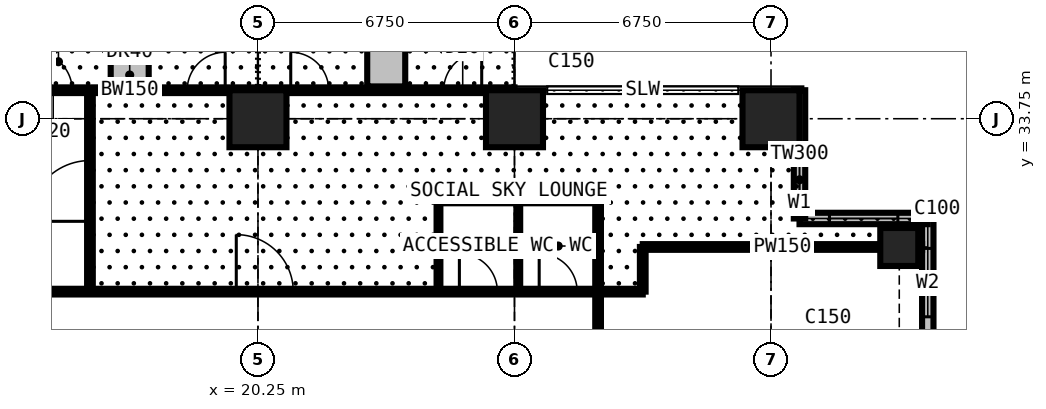
"""IFC4 building model, lengths in metres.
Left out: names, types, materials, properties, quantities, classifications, styles, units other than length and angle.
Written with IfcOpenShell. Run it as: python <this file> out.ifc"""

import sys

from ifc_helpers import new_model, si_unit, direction, frame, frame_2d, origin, origin_2d, place, context, subcontext, project, spatial, rectangle, extrude, element, fill, save


model = new_model("IFC4")
c1 = context("Model", 3, precision=1e-05, world=origin(), true_north=direction((0.0, 1.0)))
c2 = subcontext(c1, "Body", "Model", "MODEL_VIEW")
j1 = project(units=[si_unit("LENGTHUNIT", "METRE"), si_unit("PLANEANGLEUNIT", "RADIAN")], contexts=[c1])
p1 = place(None, origin())
s1 = spatial("IfcSite", under=j1, at=p1, CompositionType="ELEMENT")
p2 = place(p1, origin())
s2 = spatial("IfcBuilding", under=s1, at=p2, CompositionType="ELEMENT")
p3 = place(p2, frame((0.0, 0.0, 108.9)))
s3 = spatial("IfcBuildingStorey", under=s2, at=p3, CompositionType="ELEMENT", Elevation=108.9)
for number, where, z_axis, x_axis in (
    (1, (20.25, 33.75, 0.0), (0.0, 0.0, 1.0), (1.0, 0.0, 0.0)),
    (2, (27.0, 33.75, 0.0), (0.0, 0.0, 1.0), (1.0, 0.0, 0.0)),
    (3, (33.75, 33.75, 0.0), (0.0, 0.0, 1.0), (1.0, 0.0, 0.0)),
):
    element("IfcColumn", number, at=place(p3, frame(where, z_axis=z_axis, x_axis=x_axis)), inside=s3, PredefinedType="COLUMN", context=c2, shape_type="SweptSolid", body=[
        extrude(rectangle(XDim=1.5, YDim=1.5, at=origin_2d()), origin(), (0.0, 0.0, 1.0), 3.6),
    ])
p4 = place(p3, frame((37.125, 30.375, 0.0), z_axis=(0.0, 0.0, 1.0), x_axis=(1.0, 0.0, 0.0)))
e4 = element("IfcColumn", 4, at=p4, inside=s3, PredefinedType="COLUMN", context=c2, shape_type="SweptSolid", body=[
    extrude(rectangle(XDim=1.0, YDim=1.0, at=origin_2d()), origin(), (0.0, 0.0, 1.0), 3.6),
])
p5 = place(p3, frame((37.875, 27.75, 0.0), z_axis=(0.0, 0.0, 1.0), x_axis=(0.0, 1.0, 0.0)))
e5 = element("IfcWall", 5, at=p5, inside=s3, PredefinedType="SOLIDWALL", context=c2, shape_type="SweptSolid", body=[
    extrude(rectangle(XDim=3.375, YDim=0.3, at=frame_2d((1.688, 0.0))), origin(), (0.0, 0.0, 1.0), 3.375),
])
p6 = place(p5, frame((0.788, 0.0, 0.6)))
e6 = element("IfcOpeningElement", 6, at=p6, cuts=e5, PredefinedType="OPENING", context=c2, shape_type="SweptSolid", body=[
    extrude(rectangle(XDim=1.8, YDim=2.1, at=frame_2d((0.9, 1.05))), frame((0.0, 0.16, 0.0), z_axis=(0.0, -1.0, 0.0), x_axis=(1.0, 0.0, 0.0)), (0.0, 0.0, 1.0), 0.32),
])
p7 = place(p3, frame((37.875, 31.125, 0.0), z_axis=(0.0, 0.0, 1.0), x_axis=(-1.0, 0.0, 0.0)))
e7 = element("IfcWall", 7, at=p7, inside=s3, PredefinedType="SOLIDWALL", context=c2, shape_type="SweptSolid", body=[
    extrude(rectangle(XDim=3.375, YDim=0.3, at=frame_2d((1.688, 0.0))), origin(), (0.0, 0.0, 1.0), 3.375),
])
p8 = place(p7, frame((0.788, 0.0, 0.6)))
e8 = element("IfcOpeningElement", 8, at=p8, cuts=e7, PredefinedType="OPENING", context=c2, shape_type="SweptSolid", body=[
    extrude(rectangle(XDim=1.8, YDim=2.1, at=frame_2d((0.9, 1.05))), frame((0.0, 0.16, 0.0), z_axis=(0.0, -1.0, 0.0), x_axis=(1.0, 0.0, 0.0)), (0.0, 0.0, 1.0), 0.32),
])
p9 = place(p3, frame((34.5, 31.125, 0.0), z_axis=(0.0, 0.0, 1.0), x_axis=(0.0, 1.0, 0.0)))
e9 = element("IfcWall", 9, at=p9, inside=s3, PredefinedType="SOLIDWALL", context=c2, shape_type="SweptSolid", body=[
    extrude(rectangle(XDim=3.375, YDim=0.3, at=frame_2d((1.688, 0.0))), origin(), (0.0, 0.0, 1.0), 3.375),
])
p10 = place(p9, frame((0.268, 0.0, 0.9)))
e10 = element("IfcOpeningElement", 10, at=p10, cuts=e9, PredefinedType="OPENING", context=c2, shape_type="SweptSolid", body=[
    extrude(rectangle(XDim=1.5, YDim=1.8, at=frame_2d((0.75, 0.9))), frame((0.0, 0.16, 0.0), z_axis=(0.0, -1.0, 0.0), x_axis=(1.0, 0.0, 0.0)), (0.0, 0.0, 1.0), 0.32),
])
p11 = place(p3, frame((13.5, 34.5, 0.0), z_axis=(0.0, 0.0, 1.0), x_axis=(1.0, 0.0, 0.0)))
e11 = element("IfcWall", 11, at=p11, inside=s3, PredefinedType="SOLIDWALL", context=c2, shape_type="SweptSolid", body=[
    extrude(rectangle(XDim=6.75, YDim=0.15, at=frame_2d((3.375, 0.0))), origin(), (0.0, 0.0, 1.0), 3.375),
])
p12 = place(p11, frame((0.863, 0.0, 0.0)))
e12 = element("IfcOpeningElement", 12, at=p12, cuts=e11, PredefinedType="OPENING", context=c2, shape_type="SweptSolid", body=[
    extrude(rectangle(XDim=1.0, YDim=2.2, at=frame_2d((0.5, 1.1))), frame((0.0, 0.085, 0.0), z_axis=(0.0, -1.0, 0.0), x_axis=(1.0, 0.0, 0.0)), (0.0, 0.0, 1.0), 0.17),
])
p13 = place(p11, frame((2.512, 0.0, 0.9)))
e13 = element("IfcOpeningElement", 13, at=p13, cuts=e11, PredefinedType="OPENING", context=c2, shape_type="SweptSolid", body=[
    extrude(rectangle(XDim=0.9, YDim=1.8, at=frame_2d((0.45, 0.9))), frame((0.0, 0.085, 0.0), z_axis=(0.0, -1.0, 0.0), x_axis=(1.0, 0.0, 0.0)), (0.0, 0.0, 1.0), 0.17),
])
p14 = place(p11, frame((4.887, 0.0, 0.0)))
e14 = element("IfcOpeningElement", 14, at=p14, cuts=e11, PredefinedType="OPENING", context=c2, shape_type="SweptSolid", body=[
    extrude(rectangle(XDim=1.0, YDim=2.2, at=frame_2d((0.5, 1.1))), frame((0.0, 0.085, 0.0), z_axis=(0.0, -1.0, 0.0), x_axis=(1.0, 0.0, 0.0)), (0.0, 0.0, 1.0), 0.17),
])
p15 = place(p11, frame((3.575, 0.0, 0.9)))
e15 = element("IfcOpeningElement", 15, at=p15, cuts=e11, PredefinedType="OPENING", context=c2, shape_type="SweptSolid", body=[
    extrude(rectangle(XDim=1.2, YDim=1.8, at=frame_2d((0.6, 0.9))), frame((0.0, 0.085, 0.0), z_axis=(0.0, -1.0, 0.0), x_axis=(1.0, 0.0, 0.0)), (0.0, 0.0, 1.0), 0.17),
])
p16 = place(p3, frame((20.25, 34.5, 0.0), z_axis=(0.0, 0.0, 1.0), x_axis=(1.0, 0.0, 0.0)))
e16 = element("IfcWall", 16, at=p16, inside=s3, PredefinedType="SOLIDWALL", context=c2, shape_type="SweptSolid", body=[
    extrude(rectangle(XDim=6.75, YDim=0.15, at=frame_2d((3.375, 0.0))), origin(), (0.0, 0.0, 1.0), 3.375),
])
p17 = place(p16, frame((0.863, 0.0, 0.0)))
e17 = element("IfcOpeningElement", 17, at=p17, cuts=e16, PredefinedType="OPENING", context=c2, shape_type="SweptSolid", body=[
    extrude(rectangle(XDim=1.0, YDim=2.2, at=frame_2d((0.5, 1.1))), frame((0.0, 0.085, 0.0), z_axis=(0.0, -1.0, 0.0), x_axis=(1.0, 0.0, 0.0)), (0.0, 0.0, 1.0), 0.17),
])
p18 = place(p16, frame((1.975, 0.0, 0.9)))
e18 = element("IfcOpeningElement", 18, at=p18, cuts=e16, PredefinedType="OPENING", context=c2, shape_type="SweptSolid", body=[
    extrude(rectangle(XDim=1.2, YDim=1.8, at=frame_2d((0.6, 0.9))), frame((0.0, 0.085, 0.0), z_axis=(0.0, -1.0, 0.0), x_axis=(1.0, 0.0, 0.0)), (0.0, 0.0, 1.0), 0.17),
])
p19 = place(p16, frame((4.887, 0.0, 0.0)))
e19 = element("IfcOpeningElement", 19, at=p19, cuts=e16, PredefinedType="OPENING", context=c2, shape_type="SweptSolid", body=[
    extrude(rectangle(XDim=1.0, YDim=2.2, at=frame_2d((0.5, 1.1))), frame((0.0, 0.085, 0.0), z_axis=(0.0, -1.0, 0.0), x_axis=(1.0, 0.0, 0.0)), (0.0, 0.0, 1.0), 0.17),
])
p20 = place(p16, frame((3.575, 0.0, 0.9)))
e20 = element("IfcOpeningElement", 20, at=p20, cuts=e16, PredefinedType="OPENING", context=c2, shape_type="SweptSolid", body=[
    extrude(rectangle(XDim=1.2, YDim=1.8, at=frame_2d((0.6, 0.9))), frame((0.0, 0.085, 0.0), z_axis=(0.0, -1.0, 0.0), x_axis=(1.0, 0.0, 0.0)), (0.0, 0.0, 1.0), 0.17),
])
for number, where, z_axis, x_axis in (
    (21, (16.875, 34.6, 0.0), (0.0, 0.0, 1.0), (0.0, 1.0, 0.0)),
    (22, (23.625, 34.6, 0.0), (0.0, 0.0, 1.0), (0.0, 1.0, 0.0)),
):
    element("IfcWall", number, at=place(p3, frame(where, z_axis=z_axis, x_axis=x_axis)), inside=s3, PredefinedType="USERDEFINED", context=c2, shape_type="SweptSolid", body=[
        extrude(rectangle(XDim=2.2, YDim=1.0, at=frame_2d((1.1, 0.0))), origin(), (0.0, 0.0, 1.0), 0.9),
    ])
p21 = place(p3, frame((11.3, 29.2, 0.0), z_axis=(0.0, 0.0, 1.0), x_axis=(1.0, 0.0, 0.0)))
e23 = element("IfcWall", 23, at=p21, inside=s3, PredefinedType="PARTITIONING", context=c2, shape_type="SweptSolid", body=[
    extrude(rectangle(XDim=19.075, YDim=0.15, at=frame_2d((9.538, 0.0))), origin(), (0.0, 0.0, 1.0), 3.375),
])
p22 = place(p21, frame((14.25, 0.0, 0.0)))
e24 = element("IfcOpeningElement", 24, at=p22, cuts=e23, PredefinedType="OPENING", context=c2, shape_type="SweptSolid", body=[
    extrude(rectangle(XDim=1.0, YDim=2.2, at=frame_2d((0.5, 1.1))), frame((0.0, 0.085, 0.0), z_axis=(0.0, -1.0, 0.0), x_axis=(1.0, 0.0, 0.0)), (0.0, 0.0, 1.0), 0.17),
])
p23 = place(p21, frame((16.35, 0.0, 0.0)))
e25 = element("IfcOpeningElement", 25, at=p23, cuts=e23, PredefinedType="OPENING", context=c2, shape_type="SweptSolid", body=[
    extrude(rectangle(XDim=1.0, YDim=2.2, at=frame_2d((0.5, 1.1))), frame((0.0, 0.085, 0.0), z_axis=(0.0, -1.0, 0.0), x_axis=(1.0, 0.0, 0.0)), (0.0, 0.0, 1.0), 0.17),
])
p24 = place(p21, frame((8.379, 0.0, 0.0)))
e26 = element("IfcOpeningElement", 26, at=p24, cuts=e23, PredefinedType="OPENING", context=c2, shape_type="SweptSolid", body=[
    extrude(rectangle(XDim=1.5, YDim=2.2, at=frame_2d((0.75, 1.1))), frame((0.0, 0.085, 0.0), z_axis=(0.0, -1.0, 0.0), x_axis=(1.0, 0.0, 0.0)), (0.0, 0.0, 1.0), 0.17),
])
p25 = place(p3, frame((15.829, 29.2, 0.0), z_axis=(0.0, 0.0, 1.0), x_axis=(0.0, 1.0, 0.0)))
e27 = element("IfcWall", 27, at=p25, inside=s3, PredefinedType="PARTITIONING", context=c2, shape_type="SweptSolid", body=[
    extrude(rectangle(XDim=5.284, YDim=0.15, at=frame_2d((2.642, 0.0))), origin(), (0.0, 0.0, 1.0), 3.375),
])
p26 = place(p25, frame((1.85, 0.0, 0.0)))
e28 = element("IfcOpeningElement", 28, at=p26, cuts=e27, PredefinedType="OPENING", context=c2, shape_type="SweptSolid", body=[
    extrude(rectangle(XDim=1.6, YDim=2.4, at=frame_2d((0.8, 1.2))), frame((0.0, 0.085, 0.0), z_axis=(0.0, -1.0, 0.0), x_axis=(1.0, 0.0, 0.0)), (0.0, 0.0, 1.0), 0.17),
])
p27 = place(p3, frame((25.0, 29.2, 0.0), z_axis=(0.0, 0.0, 1.0), x_axis=(0.0, 1.0, 0.0)))
e29 = element("IfcWall", 29, at=p27, inside=s3, PredefinedType="PARTITIONING", context=c2, shape_type="SweptSolid", body=[
    extrude(rectangle(XDim=2.4, YDim=0.1, at=frame_2d((1.2, 0.0))), origin(), (0.0, 0.0, 1.0), 3.375),
])
p28 = place(p3, frame((25.0, 31.6, 0.0), z_axis=(0.0, 0.0, 1.0), x_axis=(1.0, 0.0, 0.0)))
e30 = element("IfcWall", 30, at=p28, inside=s3, PredefinedType="PARTITIONING", context=c2, shape_type="SweptSolid", body=[
    extrude(rectangle(XDim=4.2, YDim=0.15, at=frame_2d((2.1, 0.0))), origin(), (0.0, 0.0, 1.0), 3.375),
])
p29 = place(p3, frame((27.1, 29.2, 0.0), z_axis=(0.0, 0.0, 1.0), x_axis=(0.0, 1.0, 0.0)))
e31 = element("IfcWall", 31, at=p29, inside=s3, PredefinedType="PARTITIONING", context=c2, shape_type="SweptSolid", body=[
    extrude(rectangle(XDim=2.4, YDim=0.1, at=frame_2d((1.2, 0.0))), origin(), (0.0, 0.0, 1.0), 2.806),
])
p30 = place(p3, frame((29.2, 11.3, 0.0), z_axis=(0.0, 0.0, 1.0), x_axis=(0.0, 1.0, 0.0)))
e32 = element("IfcWall", 32, at=p30, inside=s3, PredefinedType="PARTITIONING", context=c2, shape_type="SweptSolid", body=[
    extrude(rectangle(XDim=20.3, YDim=0.15, at=frame_2d((10.15, 0.0))), origin(), (0.0, 0.0, 1.0), 3.375),
])
p31 = place(p30, frame((8.35, 0.0, 0.0)))
e33 = element("IfcOpeningElement", 33, at=p31, cuts=e32, PredefinedType="OPENING", context=c2, shape_type="SweptSolid", body=[
    extrude(rectangle(XDim=1.2, YDim=2.2, at=frame_2d((0.6, 1.1))), frame((0.0, 0.085, 0.0), z_axis=(0.0, -1.0, 0.0), x_axis=(1.0, 0.0, 0.0)), (0.0, 0.0, 1.0), 0.17),
])
p32 = place(p3, frame((30.375, 29.2, 0.0), z_axis=(0.0, 0.0, 1.0), x_axis=(0.0, 1.0, 0.0)))
e34 = element("IfcWall", 34, at=p32, inside=s3, PredefinedType="PARTITIONING", context=c2, shape_type="SweptSolid", body=[
    extrude(rectangle(XDim=1.175, YDim=0.15, at=frame_2d((0.587, 0.0))), origin(), (0.0, 0.0, 1.0), 3.375),
])
p33 = place(p3, frame((30.375, 30.375, 0.0), z_axis=(0.0, 0.0, 1.0), x_axis=(1.0, 0.0, 0.0)))
e35 = element("IfcWall", 35, at=p33, inside=s3, PredefinedType="PARTITIONING", context=c2, shape_type="SweptSolid", body=[
    extrude(rectangle(XDim=7.35, YDim=0.15, at=frame_2d((3.675, 0.0))), origin(), (0.0, 0.0, 1.0), 2.877),
])
p34 = place(p6, origin())
e36 = element("IfcWindow", 36, at=p34, inside=s3, PartitioningType="SINGLE_PANEL", PredefinedType="WINDOW", context=c2, shape_type="SweptSolid", body=[
    extrude(rectangle(XDim=1.8, YDim=2.1, at=frame_2d((0.9, 1.05))), frame((0.0, 0.03, 0.0), z_axis=(0.0, -1.0, 0.0), x_axis=(1.0, 0.0, 0.0)), (0.0, 0.0, 1.0), 0.06),
])
fill(e6, e36)
p35 = place(p8, origin())
e37 = element("IfcWindow", 37, at=p35, inside=s3, PartitioningType="SINGLE_PANEL", PredefinedType="WINDOW", context=c2, shape_type="SweptSolid", body=[
    extrude(rectangle(XDim=1.8, YDim=2.1, at=frame_2d((0.9, 1.05))), frame((0.0, 0.03, 0.0), z_axis=(0.0, -1.0, 0.0), x_axis=(1.0, 0.0, 0.0)), (0.0, 0.0, 1.0), 0.06),
])
fill(e8, e37)
p36 = place(p10, origin())
e38 = element("IfcWindow", 38, at=p36, inside=s3, PartitioningType="SINGLE_PANEL", PredefinedType="WINDOW", context=c2, shape_type="SweptSolid", body=[
    extrude(rectangle(XDim=1.5, YDim=1.8, at=frame_2d((0.75, 0.9))), frame((0.0, 0.03, 0.0), z_axis=(0.0, -1.0, 0.0), x_axis=(1.0, 0.0, 0.0)), (0.0, 0.0, 1.0), 0.06),
])
fill(e10, e38)
p37 = place(p12, origin())
e39 = element("IfcDoor", 39, at=p37, inside=s3, OperationType="SINGLE_SWING_LEFT", PredefinedType="DOOR", context=c2, shape_type="SweptSolid", body=[
    extrude(rectangle(XDim=1.0, YDim=2.2, at=frame_2d((0.5, 1.1))), frame((0.0, 0.025, 0.0), z_axis=(0.0, -1.0, 0.0), x_axis=(1.0, 0.0, 0.0)), (0.0, 0.0, 1.0), 0.05),
])
fill(e12, e39)
p38 = place(p13, origin())
e40 = element("IfcWindow", 40, at=p38, inside=s3, PartitioningType="SINGLE_PANEL", PredefinedType="WINDOW", context=c2, shape_type="SweptSolid", body=[
    extrude(rectangle(XDim=0.9, YDim=1.8, at=frame_2d((0.45, 0.9))), frame((0.0, 0.03, 0.0), z_axis=(0.0, -1.0, 0.0), x_axis=(1.0, 0.0, 0.0)), (0.0, 0.0, 1.0), 0.06),
])
fill(e13, e40)
p39 = place(p14, origin())
e41 = element("IfcDoor", 41, at=p39, inside=s3, OperationType="SINGLE_SWING_RIGHT", PredefinedType="DOOR", context=c2, shape_type="SweptSolid", body=[
    extrude(rectangle(XDim=1.0, YDim=2.2, at=frame_2d((0.5, 1.1))), frame((0.0, 0.025, 0.0), z_axis=(0.0, -1.0, 0.0), x_axis=(1.0, 0.0, 0.0)), (0.0, 0.0, 1.0), 0.05),
])
fill(e14, e41)
p40 = place(p15, origin())
e42 = element("IfcWindow", 42, at=p40, inside=s3, PartitioningType="SINGLE_PANEL", PredefinedType="WINDOW", context=c2, shape_type="SweptSolid", body=[
    extrude(rectangle(XDim=1.2, YDim=1.8, at=frame_2d((0.6, 0.9))), frame((0.0, 0.03, 0.0), z_axis=(0.0, -1.0, 0.0), x_axis=(1.0, 0.0, 0.0)), (0.0, 0.0, 1.0), 0.06),
])
fill(e15, e42)
p41 = place(p17, origin())
e43 = element("IfcDoor", 43, at=p41, inside=s3, OperationType="SINGLE_SWING_LEFT", PredefinedType="DOOR", context=c2, shape_type="SweptSolid", body=[
    extrude(rectangle(XDim=1.0, YDim=2.2, at=frame_2d((0.5, 1.1))), frame((0.0, 0.025, 0.0), z_axis=(0.0, -1.0, 0.0), x_axis=(1.0, 0.0, 0.0)), (0.0, 0.0, 1.0), 0.05),
])
fill(e17, e43)
p42 = place(p18, origin())
e44 = element("IfcWindow", 44, at=p42, inside=s3, PartitioningType="SINGLE_PANEL", PredefinedType="WINDOW", context=c2, shape_type="SweptSolid", body=[
    extrude(rectangle(XDim=1.2, YDim=1.8, at=frame_2d((0.6, 0.9))), frame((0.0, 0.03, 0.0), z_axis=(0.0, -1.0, 0.0), x_axis=(1.0, 0.0, 0.0)), (0.0, 0.0, 1.0), 0.06),
])
fill(e18, e44)
p43 = place(p19, origin())
e45 = element("IfcDoor", 45, at=p43, inside=s3, OperationType="SINGLE_SWING_RIGHT", PredefinedType="DOOR", context=c2, shape_type="SweptSolid", body=[
    extrude(rectangle(XDim=1.0, YDim=2.2, at=frame_2d((0.5, 1.1))), frame((0.0, 0.025, 0.0), z_axis=(0.0, -1.0, 0.0), x_axis=(1.0, 0.0, 0.0)), (0.0, 0.0, 1.0), 0.05),
])
fill(e19, e45)
p44 = place(p20, origin())
e46 = element("IfcWindow", 46, at=p44, inside=s3, PartitioningType="SINGLE_PANEL", PredefinedType="WINDOW", context=c2, shape_type="SweptSolid", body=[
    extrude(rectangle(XDim=1.2, YDim=1.8, at=frame_2d((0.6, 0.9))), frame((0.0, 0.03, 0.0), z_axis=(0.0, -1.0, 0.0), x_axis=(1.0, 0.0, 0.0)), (0.0, 0.0, 1.0), 0.06),
])
fill(e20, e46)
p45 = place(p22, origin())
e47 = element("IfcDoor", 47, at=p45, inside=s3, OperationType="SINGLE_SWING_LEFT", PredefinedType="DOOR", context=c2, shape_type="SweptSolid", body=[
    extrude(rectangle(XDim=1.0, YDim=2.2, at=frame_2d((0.5, 1.1))), frame((0.0, 0.025, 0.0), z_axis=(0.0, -1.0, 0.0), x_axis=(1.0, 0.0, 0.0)), (0.0, 0.0, 1.0), 0.05),
])
fill(e24, e47)
p46 = place(p23, origin())
e48 = element("IfcDoor", 48, at=p46, inside=s3, OperationType="SINGLE_SWING_LEFT", PredefinedType="DOOR", context=c2, shape_type="SweptSolid", body=[
    extrude(rectangle(XDim=1.0, YDim=2.2, at=frame_2d((0.5, 1.1))), frame((0.0, 0.025, 0.0), z_axis=(0.0, -1.0, 0.0), x_axis=(1.0, 0.0, 0.0)), (0.0, 0.0, 1.0), 0.05),
])
fill(e25, e48)
p47 = place(p26, origin())
e49 = element("IfcDoor", 49, at=p47, inside=s3, OperationType="DOUBLE_DOOR_SINGLE_SWING", PredefinedType="DOOR", context=c2, shape_type="SweptSolid", body=[
    extrude(rectangle(XDim=1.6, YDim=2.4, at=frame_2d((0.8, 1.2))), frame((0.0, 0.025, 0.0), z_axis=(0.0, -1.0, 0.0), x_axis=(1.0, 0.0, 0.0)), (0.0, 0.0, 1.0), 0.05),
])
fill(e28, e49)
p48 = place(p24, origin())
e50 = element("IfcDoor", 50, at=p48, inside=s3, OperationType="DOUBLE_DOOR_SINGLE_SWING", PredefinedType="DOOR", context=c2, shape_type="SweptSolid", body=[
    extrude(rectangle(XDim=1.5, YDim=2.2, at=frame_2d((0.75, 1.1))), frame((0.0, 0.025, 0.0), z_axis=(0.0, -1.0, 0.0), x_axis=(1.0, 0.0, 0.0)), (0.0, 0.0, 1.0), 0.05),
])
fill(e26, e50)
save(model, sys.argv[1])
